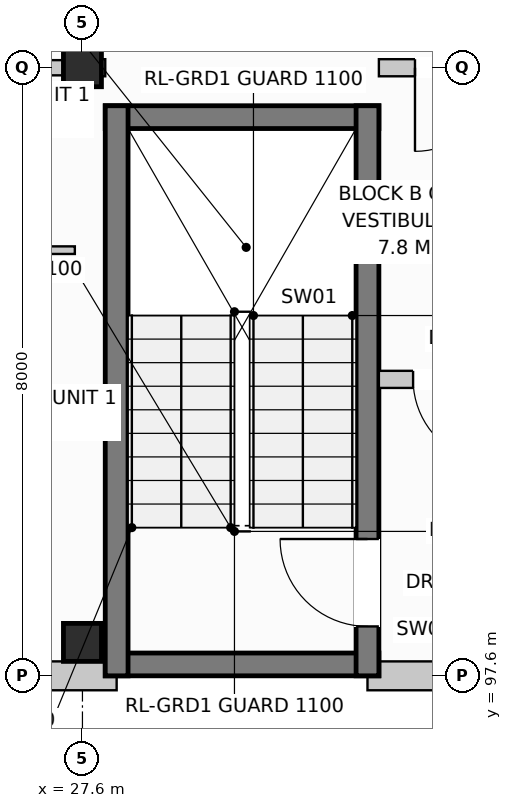
"""IFC4 building model, lengths in metres.
Left out: names, types, materials, properties, quantities, classifications, styles, units other than length and angle.
Written with IfcOpenShell. Run it as: python <this file> out.ifc"""

import sys

from ifc_helpers import new_model, si_unit, direction, frame, frame_2d, origin, origin_with_axes, origin_2d, place, context, subcontext, project, spatial, rectangle, extrude, element, fill, save


model = new_model("IFC4")
c1 = context("Model", 3, precision=1e-05, world=origin(), true_north=direction((0.0, 1.0)))
c2 = subcontext(c1, "Body", "Model", "MODEL_VIEW")
j1 = project(units=[si_unit("LENGTHUNIT", "METRE"), si_unit("PLANEANGLEUNIT", "RADIAN")], contexts=[c1])
p1 = place(None, origin())
s1 = spatial("IfcSite", under=j1, at=p1, CompositionType="ELEMENT")
p2 = place(p1, origin())
s2 = spatial("IfcBuilding", under=s1, at=p2, CompositionType="ELEMENT")
p3 = place(p2, frame((0.0, 0.0, 4.4)))
s3 = spatial("IfcBuildingStorey", under=s2, at=p3, CompositionType="ELEMENT", Elevation=4.4)
for number, where, z_axis, x_axis in (
    (1, (27.6, 98.04, 0.0), (0.0, 0.0, 1.0), (1.0, 0.0, 0.0)),
    (2, (27.6, 105.6, 0.0), (0.0, 0.0, 1.0), (1.0, 0.0, 0.0)),
):
    element("IfcColumn", number, at=place(p3, frame(where, z_axis=z_axis, x_axis=x_axis)), inside=s3, PredefinedType="COLUMN", context=c2, shape_type="SweptSolid", body=[
        extrude(rectangle(XDim=0.5, YDim=0.5, at=origin_2d()), origin(), (0.0, 0.0, 1.0), 3.6),
    ])
p4 = place(p3, frame((10.65, 97.6, 0.0), z_axis=(0.0, 0.0, 1.0), x_axis=(1.0, 0.0, 0.0)))
e3 = element("IfcWall", 3, at=p4, inside=s3, PredefinedType="STANDARD", context=c2, shape_type="SweptSolid", body=[
    extrude(rectangle(XDim=17.4, YDim=0.38, at=frame_2d((8.7, 0.0))), origin(), (0.0, 0.0, 1.0), 3.33),
])
p5 = place(p4, frame((11.825, 0.0, 0.0)))
e4 = element("IfcOpeningElement", 4, at=p5, cuts=e3, PredefinedType="OPENING", context=c2, shape_type="SweptSolid", body=[
    extrude(rectangle(XDim=1.05, YDim=2.12, at=frame_2d((0.525, 1.06))), frame((0.0, 0.202, 0.0), z_axis=(0.0, -1.0, 0.0), x_axis=(1.0, 0.0, 0.0)), (0.0, 0.0, 1.0), 0.404),
])
p6 = place(p4, frame((10.62, 0.0, 0.9)))
e5 = element("IfcOpeningElement", 5, at=p6, cuts=e3, PredefinedType="OPENING", context=c2, shape_type="SweptSolid", body=[
    extrude(rectangle(XDim=0.95, YDim=1.55, at=frame_2d((0.475, 0.775))), frame((0.0, 0.202, 0.0), z_axis=(0.0, -1.0, 0.0), x_axis=(1.0, 0.0, 0.0)), (0.0, 0.0, 1.0), 0.404),
])
p7 = place(p4, frame((14.47, 0.0, 0.8)))
e6 = element("IfcOpeningElement", 6, at=p7, cuts=e3, PredefinedType="OPENING", context=c2, shape_type="SweptSolid", body=[
    extrude(rectangle(XDim=1.9, YDim=1.85, at=frame_2d((0.95, 0.925))), frame((0.0, 0.202, 0.0), z_axis=(0.0, -1.0, 0.0), x_axis=(1.0, 0.0, 0.0)), (0.0, 0.0, 1.0), 0.404),
])
p8 = place(p3, frame((31.35, 97.6, 0.0), z_axis=(0.0, 0.0, 1.0), x_axis=(1.0, 0.0, 0.0)))
e7 = element("IfcWall", 7, at=p8, inside=s3, PredefinedType="STANDARD", context=c2, shape_type="SweptSolid", body=[
    extrude(rectangle(XDim=23.67, YDim=0.38, at=frame_2d((11.835, 0.0))), origin(), (0.0, 0.0, 1.0), 3.33),
])
p9 = place(p8, frame((17.57, 0.0, 0.0)))
e8 = element("IfcOpeningElement", 8, at=p9, cuts=e7, PredefinedType="OPENING", context=c2, shape_type="SweptSolid", body=[
    extrude(rectangle(XDim=1.05, YDim=2.12, at=frame_2d((0.525, 1.06))), frame((0.0, 0.202, 0.0), z_axis=(0.0, -1.0, 0.0), x_axis=(1.0, 0.0, 0.0)), (0.0, 0.0, 1.0), 0.404),
])
p10 = place(p8, frame((11.745, 0.0, 0.8)))
e9 = element("IfcOpeningElement", 9, at=p10, cuts=e7, PredefinedType="OPENING", context=c2, shape_type="SweptSolid", body=[
    extrude(rectangle(XDim=1.95, YDim=1.65, at=frame_2d((0.975, 0.825))), frame((0.0, 0.202, 0.0), z_axis=(0.0, -1.0, 0.0), x_axis=(1.0, 0.0, 0.0)), (0.0, 0.0, 1.0), 0.404),
])
p11 = place(p8, frame((20.72, 0.0, 0.8)))
e10 = element("IfcOpeningElement", 10, at=p11, cuts=e7, PredefinedType="OPENING", context=c2, shape_type="SweptSolid", body=[
    extrude(rectangle(XDim=1.8, YDim=1.7, at=frame_2d((0.9, 0.85))), frame((0.0, 0.202, 0.0), z_axis=(0.0, -1.0, 0.0), x_axis=(1.0, 0.0, 0.0)), (0.0, 0.0, 1.0), 0.404),
])
for number, where, z_axis, x_axis in (
    (11, (27.9, 97.75, 0.0), (0.0, 0.0, 1.0), (1.0, 0.0, 0.0)),
    (12, (27.9, 104.95, 0.0), (0.0, 0.0, 1.0), (1.0, 0.0, 0.0)),
):
    element("IfcWall", number, at=place(p3, frame(where, z_axis=z_axis, x_axis=x_axis)), inside=s3, PredefinedType="SHEAR", context=c2, shape_type="SweptSolid", body=[
        extrude(rectangle(XDim=3.6, YDim=0.3, at=frame_2d((1.8, 0.0))), origin(), (0.0, 0.0, 1.0), 3.33),
    ])
p12 = place(p3, frame((28.05, 97.6, 0.0), z_axis=(0.0, 0.0, 1.0), x_axis=(0.0, 1.0, 0.0)))
e13 = element("IfcWall", 13, at=p12, inside=s3, PredefinedType="SHEAR", context=c2, shape_type="SweptSolid", body=[
    extrude(rectangle(XDim=7.5, YDim=0.3, at=frame_2d((3.75, 0.0))), origin(), (0.0, 0.0, 1.0), 3.33),
])
p13 = place(p3, frame((31.35, 97.6, 0.0), z_axis=(0.0, 0.0, 1.0), x_axis=(0.0, 1.0, 0.0)))
e14 = element("IfcWall", 14, at=p13, inside=s3, PredefinedType="SHEAR", context=c2, shape_type="SweptSolid", body=[
    extrude(rectangle(XDim=7.5, YDim=0.3, at=frame_2d((3.75, 0.0))), origin(), (0.0, 0.0, 1.0), 3.33),
])
p14 = place(p13, frame((0.65, 0.0, 0.0)))
e15 = element("IfcOpeningElement", 15, at=p14, cuts=e14, PredefinedType="OPENING", context=c2, shape_type="SweptSolid", body=[
    extrude(rectangle(XDim=1.15, YDim=2.15, at=frame_2d((0.575, 1.075))), frame((0.0, 0.162, 0.0), z_axis=(0.0, -1.0, 0.0), x_axis=(1.0, 0.0, 0.0)), (0.0, 0.0, 1.0), 0.324),
])
p15 = place(p3, frame((31.5, 101.5, 0.0), z_axis=(0.0, 0.0, 1.0), x_axis=(1.0, 0.0, 0.0)))
e16 = element("IfcWall", 16, at=p15, inside=s3, PredefinedType="PARTITIONING", context=c2, shape_type="SweptSolid", body=[
    extrude(rectangle(XDim=2.2, YDim=0.225, at=frame_2d((1.1, 0.0))), origin(), (0.0, 0.0, 1.0), 3.33),
])
p16 = place(p15, frame((0.45, 0.0, 0.0)))
e17 = element("IfcOpeningElement", 17, at=p16, cuts=e16, PredefinedType="OPENING", context=c2, shape_type="SweptSolid", body=[
    extrude(rectangle(XDim=1.1, YDim=2.15, at=frame_2d((0.55, 1.075))), frame((0.0, 0.125, 0.0), z_axis=(0.0, -1.0, 0.0), x_axis=(1.0, 0.0, 0.0)), (0.0, 0.0, 1.0), 0.249),
])
p17 = place(p3, frame((27.6, 105.6, 0.0), z_axis=(0.0, 0.0, 1.0), x_axis=(1.0, 0.0, 0.0)))
e18 = element("IfcWall", 18, at=p17, inside=s3, PredefinedType="PARTITIONING", context=c2, shape_type="SweptSolid", body=[
    extrude(rectangle(XDim=0.3, YDim=0.225, at=frame_2d((0.15, 0.0))), origin(), (0.0, 0.0, 1.0), 3.33),
])
p18 = place(p3, frame((31.5, 105.6, 0.0), z_axis=(0.0, 0.0, 1.0), x_axis=(1.0, 0.0, 0.0)))
e19 = element("IfcWall", 19, at=p18, inside=s3, PredefinedType="PARTITIONING", context=c2, shape_type="SweptSolid", body=[
    extrude(rectangle(XDim=9.9, YDim=0.225, at=frame_2d((4.95, 0.0))), origin(), (0.0, 0.0, 1.0), 2.77),
])
p19 = place(p18, frame((0.475, 0.0, 0.0)))
e20 = element("IfcOpeningElement", 20, at=p19, cuts=e19, PredefinedType="OPENING", context=c2, shape_type="SweptSolid", body=[
    extrude(rectangle(XDim=1.1, YDim=2.15, at=frame_2d((0.55, 1.075))), frame((0.0, 0.125, 0.0), z_axis=(0.0, -1.0, 0.0), x_axis=(1.0, 0.0, 0.0)), (0.0, 0.0, 1.0), 0.249),
])
p20 = place(p18, frame((5.75, 0.0, 0.0)))
e21 = element("IfcOpeningElement", 21, at=p20, cuts=e19, PredefinedType="OPENING", context=c2, shape_type="SweptSolid", body=[
    extrude(rectangle(XDim=0.9, YDim=2.1, at=frame_2d((0.45, 1.05))), frame((0.0, 0.125, 0.0), z_axis=(0.0, -1.0, 0.0), x_axis=(1.0, 0.0, 0.0)), (0.0, 0.0, 1.0), 0.249),
])
p21 = place(p18, frame((7.8, 0.0, 0.0)))
e22 = element("IfcOpeningElement", 22, at=p21, cuts=e19, PredefinedType="OPENING", context=c2, shape_type="SweptSolid", body=[
    extrude(rectangle(XDim=0.95, YDim=2.15, at=frame_2d((0.475, 1.075))), frame((0.0, 0.125, 0.0), z_axis=(0.0, -1.0, 0.0), x_axis=(1.0, 0.0, 0.0)), (0.0, 0.0, 1.0), 0.249),
])
p22 = place(p3, frame((20.7, 105.6, 0.0), z_axis=(0.0, 0.0, 1.0), x_axis=(1.0, 0.0, 0.0)))
e23 = element("IfcWall", 23, at=p22, inside=s3, PredefinedType="PARTITIONING", context=c2, shape_type="SweptSolid", body=[
    extrude(rectangle(XDim=6.9, YDim=0.2, at=frame_2d((3.45, 0.0))), origin(), (0.0, 0.0, 1.0), 2.77),
])
p23 = place(p22, frame((2.0, 0.0, 0.0)))
e24 = element("IfcOpeningElement", 24, at=p23, cuts=e23, PredefinedType="OPENING", context=c2, shape_type="SweptSolid", body=[
    extrude(rectangle(XDim=0.95, YDim=2.15, at=frame_2d((0.475, 1.075))), frame((0.0, 0.112, 0.0), z_axis=(0.0, -1.0, 0.0), x_axis=(1.0, 0.0, 0.0)), (0.0, 0.0, 1.0), 0.224),
])
for number, where, z_axis, x_axis in (
    (25, (24.6, 103.2, 0.0), (0.0, 0.0, 1.0), (1.0, 0.0, 0.0)),
    (26, (24.6, 101.1, 0.0), (0.0, 0.0, 1.0), (1.0, 0.0, 0.0)),
):
    element("IfcWall", number, at=place(p3, frame(where, z_axis=z_axis, x_axis=x_axis)), inside=s3, PredefinedType="PARTITIONING", context=c2, shape_type="SweptSolid", body=[
        extrude(rectangle(XDim=2.9, YDim=0.1, at=frame_2d((1.45, 0.0))), origin(), (0.0, 0.0, 1.0), 3.33),
    ])
p24 = place(p14, origin_with_axes())
e27 = element("IfcDoor", 27, at=p24, inside=s3, OperationType="SINGLE_SWING_RIGHT", PredefinedType="DOOR", context=c2, shape_type="SweptSolid", body=[
    extrude(rectangle(XDim=1.15, YDim=2.15, at=frame_2d((0.575, 1.075))), frame((0.0, 0.025, 0.0), z_axis=(0.0, -1.0, 0.0), x_axis=(1.0, 0.0, 0.0)), (0.0, 0.0, 1.0), 0.05),
])
fill(e15, e27)
p25 = place(p16, frame((1.1, 0.0, 0.0), z_axis=(0.0, 0.0, 1.0), x_axis=(-1.0, 0.0, 0.0)))
e28 = element("IfcDoor", 28, at=p25, inside=s3, OperationType="SINGLE_SWING_RIGHT", PredefinedType="DOOR", context=c2, shape_type="SweptSolid", body=[
    extrude(rectangle(XDim=1.1, YDim=2.15, at=frame_2d((0.55, 1.075))), frame((0.0, 0.025, 0.0), z_axis=(0.0, -1.0, 0.0), x_axis=(1.0, 0.0, 0.0)), (0.0, 0.0, 1.0), 0.05),
])
fill(e17, e28)
p26 = place(p19, frame((1.1, 0.0, 0.0), z_axis=(0.0, 0.0, 1.0), x_axis=(-1.0, 0.0, 0.0)))
e29 = element("IfcDoor", 29, at=p26, inside=s3, OperationType="SINGLE_SWING_LEFT", PredefinedType="DOOR", context=c2, shape_type="SweptSolid", body=[
    extrude(rectangle(XDim=1.1, YDim=2.15, at=frame_2d((0.55, 1.075))), frame((0.0, 0.025, 0.0), z_axis=(0.0, -1.0, 0.0), x_axis=(1.0, 0.0, 0.0)), (0.0, 0.0, 1.0), 0.05),
])
fill(e20, e29)
save(model, sys.argv[1])
